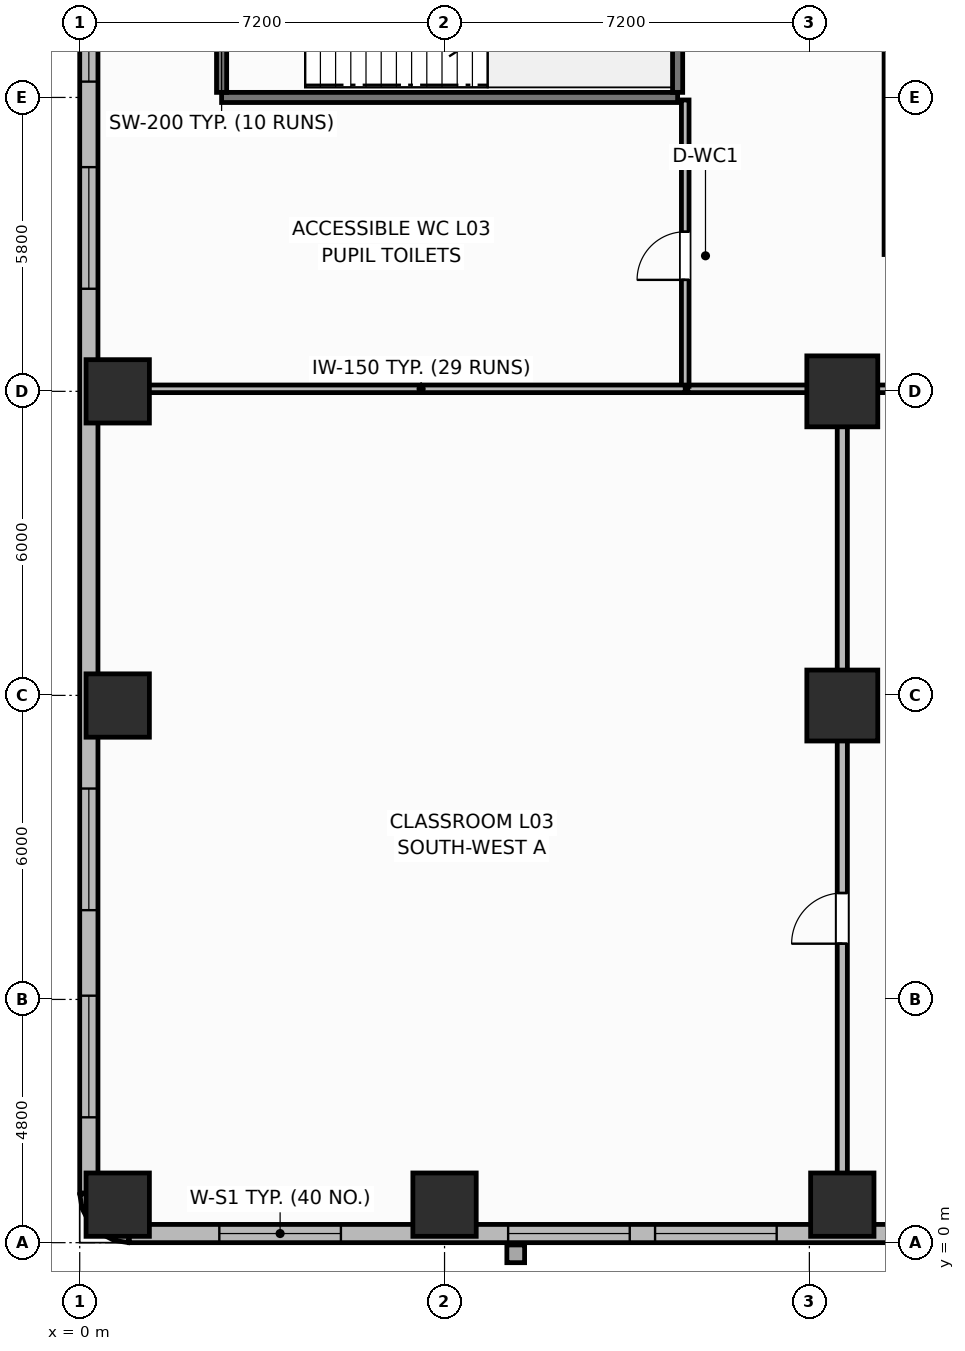
"""IFC4 building model, lengths in metres.
Left out: names, types, materials, properties, quantities, classifications, styles, units other than length and angle.
Written with IfcOpenShell. Run it as: python <this file> out.ifc"""

import sys

from ifc_helpers import new_model, si_unit, direction, frame, frame_2d, origin, origin_2d, place, context, subcontext, project, spatial, rectangle, extrude, element, fill, save


model = new_model("IFC4")
c1 = context("Model", 3, precision=1e-05, world=origin(), true_north=direction((0.0, 1.0)))
c2 = subcontext(c1, "Body", "Model", "MODEL_VIEW")
j1 = project(units=[si_unit("LENGTHUNIT", "METRE"), si_unit("PLANEANGLEUNIT", "RADIAN")], contexts=[c1])
p1 = place(None, origin())
s1 = spatial("IfcSite", under=j1, at=p1, CompositionType="ELEMENT")
p2 = place(p1, origin())
s2 = spatial("IfcBuilding", under=s1, at=p2, CompositionType="ELEMENT")
p3 = place(p2, frame((0.0, 0.0, 15.6)))
s3 = spatial("IfcBuildingStorey", under=s2, at=p3, CompositionType="ELEMENT", Elevation=15.6)
for number, where, z_axis, x_axis in (
    (1, (0.75, 0.75, 0.0), (0.0, 0.0, 1.0), (1.0, 0.0, 0.0)),
    (2, (0.75, 10.6, 0.0), (0.0, 0.0, 1.0), (1.0, 0.0, 0.0)),
    (3, (0.75, 16.8, 0.0), (0.0, 0.0, 1.0), (1.0, 0.0, 0.0)),
    (4, (7.2, 0.75, 0.0), (0.0, 0.0, 1.0), (1.0, 0.0, 0.0)),
    (5, (15.05, 0.75, 0.0), (0.0, 0.0, 1.0), (1.0, 0.0, 0.0)),
):
    element("IfcColumn", number, at=place(p3, frame(where, z_axis=z_axis, x_axis=x_axis)), inside=s3, PredefinedType="COLUMN", context=c2, shape_type="SweptSolid", body=[
        extrude(rectangle(XDim=1.25, YDim=1.25, at=origin_2d()), origin(), (0.0, 0.0, 1.0), 4.5),
    ])
for number, where, z_axis, x_axis in (
    (6, (15.05, 10.6, 0.0), (0.0, 0.0, 1.0), (1.0, 0.0, 0.0)),
    (7, (15.05, 16.8, 0.0), (0.0, 0.0, 1.0), (1.0, 0.0, 0.0)),
):
    element("IfcColumn", number, at=place(p3, frame(where, z_axis=z_axis, x_axis=x_axis)), inside=s3, PredefinedType="COLUMN", context=c2, shape_type="SweptSolid", body=[
        extrude(rectangle(XDim=1.4, YDim=1.4, at=origin_2d()), origin(), (0.0, 0.0, 1.0), 4.5),
    ])
for number, where, z_axis, x_axis in (
    (8, (0.18, 0.98, 0.0), (0.0, 0.0, 1.0), (0.157, -0.988, 0.0)),
    (9, (0.219, 0.733, 0.0), (0.0, 0.0, 1.0), (0.453, -0.891, 0.0)),
    (10, (0.333, 0.51, 0.0), (0.0, 0.0, 1.0), (0.707, -0.707, 0.0)),
    (11, (0.51, 0.333, 0.0), (0.0, 0.0, 1.0), (0.891, -0.453, 0.0)),
    (12, (0.733, 0.219, 0.0), (0.0, 0.0, 1.0), (0.988, -0.157, 0.0)),
):
    element("IfcWall", number, at=place(p3, frame(where, z_axis=z_axis, x_axis=x_axis)), inside=s3, PredefinedType="SOLIDWALL", context=c2, shape_type="SweptSolid", body=[
        extrude(rectangle(XDim=0.25, YDim=0.36, at=frame_2d((0.125, 0.0))), origin(), (0.0, 0.0, 1.0), 3.48),
    ])
p4 = place(p3, frame((0.98, 0.18, 0.0), z_axis=(0.0, 0.0, 1.0), x_axis=(1.0, 0.0, 0.0)))
e13 = element("IfcWall", 13, at=p4, inside=s3, PredefinedType="SOLIDWALL", context=c2, shape_type="SweptSolid", body=[
    extrude(rectangle(XDim=15.25, YDim=0.36, at=frame_2d((7.625, 0.0))), origin(), (0.0, 0.0, 1.0), 3.48),
])
p5 = place(p4, frame((1.775, 0.0, 0.85)))
e14 = element("IfcOpeningElement", 14, at=p5, cuts=e13, PredefinedType="OPENING", context=c2, shape_type="SweptSolid", body=[
    extrude(rectangle(XDim=2.4, YDim=2.25, at=frame_2d((1.2, 1.125))), frame((0.0, 0.19, 0.0), z_axis=(0.0, -1.0, 0.0), x_axis=(1.0, 0.0, 0.0)), (0.0, 0.0, 1.0), 0.38),
])
p6 = place(p4, frame((7.475, 0.0, 0.85)))
e15 = element("IfcOpeningElement", 15, at=p6, cuts=e13, PredefinedType="OPENING", context=c2, shape_type="SweptSolid", body=[
    extrude(rectangle(XDim=2.4, YDim=2.25, at=frame_2d((1.2, 1.125))), frame((0.0, 0.19, 0.0), z_axis=(0.0, -1.0, 0.0), x_axis=(1.0, 0.0, 0.0)), (0.0, 0.0, 1.0), 0.38),
])
p7 = place(p4, frame((10.375, 0.0, 0.85)))
e16 = element("IfcOpeningElement", 16, at=p7, cuts=e13, PredefinedType="OPENING", context=c2, shape_type="SweptSolid", body=[
    extrude(rectangle(XDim=2.4, YDim=2.25, at=frame_2d((1.2, 1.125))), frame((0.0, 0.19, 0.0), z_axis=(0.0, -1.0, 0.0), x_axis=(1.0, 0.0, 0.0)), (0.0, 0.0, 1.0), 0.38),
])
p8 = place(p3, frame((0.18, 55.42, 0.0), z_axis=(0.0, 0.0, 1.0), x_axis=(0.0, -1.0, 0.0)))
e17 = element("IfcWall", 17, at=p8, inside=s3, PredefinedType="SOLIDWALL", context=c2, shape_type="SweptSolid", body=[
    extrude(rectangle(XDim=54.44, YDim=0.36, at=frame_2d((27.22, 0.0))), origin(), (0.0, 0.0, 1.0), 3.48),
])
p9 = place(p8, frame((1.494, 0.0, 0.85)))
e18 = element("IfcOpeningElement", 18, at=p9, cuts=e17, PredefinedType="OPENING", context=c2, shape_type="SweptSolid", body=[
    extrude(rectangle(XDim=2.4, YDim=2.25, at=frame_2d((1.2, 1.125))), frame((0.0, 0.19, 0.0), z_axis=(0.0, -1.0, 0.0), x_axis=(1.0, 0.0, 0.0)), (0.0, 0.0, 1.0), 0.38),
])
p10 = place(p8, frame((5.582, 0.0, 0.85)))
e19 = element("IfcOpeningElement", 19, at=p10, cuts=e17, PredefinedType="OPENING", context=c2, shape_type="SweptSolid", body=[
    extrude(rectangle(XDim=2.4, YDim=2.25, at=frame_2d((1.2, 1.125))), frame((0.0, 0.19, 0.0), z_axis=(0.0, -1.0, 0.0), x_axis=(1.0, 0.0, 0.0)), (0.0, 0.0, 1.0), 0.38),
])
p11 = place(p8, frame((17.844, 0.0, 0.85)))
e20 = element("IfcOpeningElement", 20, at=p11, cuts=e17, PredefinedType="OPENING", context=c2, shape_type="SweptSolid", body=[
    extrude(rectangle(XDim=2.4, YDim=2.25, at=frame_2d((1.2, 1.125))), frame((0.0, 0.19, 0.0), z_axis=(0.0, -1.0, 0.0), x_axis=(1.0, 0.0, 0.0)), (0.0, 0.0, 1.0), 0.38),
])
p12 = place(p8, frame((21.932, 0.0, 0.85)))
e21 = element("IfcOpeningElement", 21, at=p12, cuts=e17, PredefinedType="OPENING", context=c2, shape_type="SweptSolid", body=[
    extrude(rectangle(XDim=2.4, YDim=2.25, at=frame_2d((1.2, 1.125))), frame((0.0, 0.19, 0.0), z_axis=(0.0, -1.0, 0.0), x_axis=(1.0, 0.0, 0.0)), (0.0, 0.0, 1.0), 0.38),
])
p13 = place(p8, frame((30.108, 0.0, 0.85)))
e22 = element("IfcOpeningElement", 22, at=p13, cuts=e17, PredefinedType="OPENING", context=c2, shape_type="SweptSolid", body=[
    extrude(rectangle(XDim=2.4, YDim=2.25, at=frame_2d((1.2, 1.125))), frame((0.0, 0.19, 0.0), z_axis=(0.0, -1.0, 0.0), x_axis=(1.0, 0.0, 0.0)), (0.0, 0.0, 1.0), 0.38),
])
p14 = place(p8, frame((34.195, 0.0, 0.85)))
e23 = element("IfcOpeningElement", 23, at=p14, cuts=e17, PredefinedType="OPENING", context=c2, shape_type="SweptSolid", body=[
    extrude(rectangle(XDim=2.4, YDim=2.25, at=frame_2d((1.2, 1.125))), frame((0.0, 0.19, 0.0), z_axis=(0.0, -1.0, 0.0), x_axis=(1.0, 0.0, 0.0)), (0.0, 0.0, 1.0), 0.38),
])
p15 = place(p8, frame((46.458, 0.0, 0.85)))
e24 = element("IfcOpeningElement", 24, at=p15, cuts=e17, PredefinedType="OPENING", context=c2, shape_type="SweptSolid", body=[
    extrude(rectangle(XDim=2.4, YDim=2.25, at=frame_2d((1.2, 1.125))), frame((0.0, 0.19, 0.0), z_axis=(0.0, -1.0, 0.0), x_axis=(1.0, 0.0, 0.0)), (0.0, 0.0, 1.0), 0.38),
])
p16 = place(p8, frame((50.546, 0.0, 0.85)))
e25 = element("IfcOpeningElement", 25, at=p16, cuts=e17, PredefinedType="OPENING", context=c2, shape_type="SweptSolid", body=[
    extrude(rectangle(XDim=2.4, YDim=2.25, at=frame_2d((1.2, 1.125))), frame((0.0, 0.19, 0.0), z_axis=(0.0, -1.0, 0.0), x_axis=(1.0, 0.0, 0.0)), (0.0, 0.0, 1.0), 0.38),
])
p17 = place(p3, frame((2.8, 22.6, 0.0), z_axis=(0.0, 0.0, 1.0), x_axis=(1.0, 0.0, 0.0)))
e26 = element("IfcWall", 26, at=p17, inside=s3, PredefinedType="SHEAR", context=c2, shape_type="SweptSolid", body=[
    extrude(rectangle(XDim=9.0, YDim=0.2, at=frame_2d((4.5, 0.0))), origin(), (0.0, 0.0, 1.0), 4.5),
])
for number, where, z_axis, x_axis in (
    (27, (2.8, 22.7, 0.0), (0.0, 0.0, 1.0), (0.0, 1.0, 0.0)),
    (28, (11.8, 22.7, 0.0), (0.0, 0.0, 1.0), (0.0, 1.0, 0.0)),
):
    element("IfcWall", number, at=place(p3, frame(where, z_axis=z_axis, x_axis=x_axis)), inside=s3, PredefinedType="SHEAR", context=c2, shape_type="SweptSolid", body=[
        extrude(rectangle(XDim=3.4, YDim=0.2, at=frame_2d((1.7, 0.0))), origin(), (0.0, 0.0, 1.0), 4.5),
    ])
p18 = place(p3, frame((15.95, 19.5, 0.0), z_axis=(0.0, 0.0, 1.0), x_axis=(0.0, 1.0, 0.0)))
e29 = element("IfcWall", 29, at=p18, inside=s3, PredefinedType="PARTITIONING", context=c2, shape_type="SweptSolid", body=[
    extrude(rectangle(XDim=17.4, YDim=0.15, at=frame_2d((8.7, 0.0))), origin(), (0.0, 0.0, 1.0), 3.42),
])
p19 = place(p3, frame((15.05, 0.4, 0.0), z_axis=(0.0, 0.0, 1.0), x_axis=(0.0, 1.0, 0.0)))
e30 = element("IfcWall", 30, at=p19, inside=s3, PredefinedType="PARTITIONING", context=c2, shape_type="SweptSolid", body=[
    extrude(rectangle(XDim=16.4, YDim=0.2, at=frame_2d((8.2, 0.0))), origin(), (0.0, 0.0, 1.0), 3.42),
])
p20 = place(p19, frame((5.5, 0.0, 0.0)))
e31 = element("IfcOpeningElement", 31, at=p20, cuts=e30, PredefinedType="OPENING", context=c2, shape_type="SweptSolid", body=[
    extrude(rectangle(XDim=1.0, YDim=2.15, at=frame_2d((0.5, 1.075))), frame((0.0, 0.11, 0.0), z_axis=(0.0, -1.0, 0.0), x_axis=(1.0, 0.0, 0.0)), (0.0, 0.0, 1.0), 0.22),
])
p21 = place(p3, frame((12.0, 16.85, 0.0), z_axis=(0.0, 0.0, 1.0), x_axis=(1.0, 0.0, 0.0)))
e32 = element("IfcWall", 32, at=p21, inside=s3, PredefinedType="PARTITIONING", context=c2, shape_type="SweptSolid", body=[
    extrude(rectangle(XDim=13.25, YDim=0.15, at=frame_2d((6.625, 0.0))), origin(), (0.0, 0.0, 1.0), 3.42),
])
p22 = place(p21, frame((7.5, 0.0, 0.0)))
e33 = element("IfcOpeningElement", 33, at=p22, cuts=e32, PredefinedType="OPENING", context=c2, shape_type="SweptSolid", body=[
    extrude(rectangle(XDim=1.0, YDim=2.15, at=frame_2d((0.5, 1.075))), frame((0.0, 0.085, 0.0), z_axis=(0.0, -1.0, 0.0), x_axis=(1.0, 0.0, 0.0)), (0.0, 0.0, 1.0), 0.17),
])
p23 = place(p3, frame((11.95, 16.9, 0.0), z_axis=(0.0, 0.0, 1.0), x_axis=(0.0, 1.0, 0.0)))
e34 = element("IfcWall", 34, at=p23, inside=s3, PredefinedType="PARTITIONING", context=c2, shape_type="SweptSolid", body=[
    extrude(rectangle(XDim=5.65, YDim=0.15, at=frame_2d((2.825, 0.0))), origin(), (0.0, 0.0, 1.0), 3.42),
])
p24 = place(p23, frame((2.1, 0.0, 0.0)))
e35 = element("IfcOpeningElement", 35, at=p24, cuts=e34, PredefinedType="OPENING", context=c2, shape_type="SweptSolid", body=[
    extrude(rectangle(XDim=0.95, YDim=2.1, at=frame_2d((0.475, 1.05))), frame((0.0, 0.085, 0.0), z_axis=(0.0, -1.0, 0.0), x_axis=(1.0, 0.0, 0.0)), (0.0, 0.0, 1.0), 0.17),
])
p25 = place(p3, frame((0.4, 16.85, 0.0), z_axis=(0.0, 0.0, 1.0), x_axis=(1.0, 0.0, 0.0)))
e36 = element("IfcWall", 36, at=p25, inside=s3, PredefinedType="PARTITIONING", context=c2, shape_type="SweptSolid", body=[
    extrude(rectangle(XDim=11.55, YDim=0.15, at=frame_2d((5.775, 0.0))), origin(), (0.0, 0.0, 1.0), 3.42),
])
p26 = place(p5, origin())
e37 = element("IfcWindow", 37, at=p26, inside=s3, PartitioningType="SINGLE_PANEL", PredefinedType="WINDOW", context=c2, shape_type="SweptSolid", body=[
    extrude(rectangle(XDim=2.4, YDim=2.25, at=frame_2d((1.2, 1.125))), frame((0.0, 0.03, 0.0), z_axis=(0.0, -1.0, 0.0), x_axis=(1.0, 0.0, 0.0)), (0.0, 0.0, 1.0), 0.06),
])
fill(e14, e37)
p27 = place(p6, origin())
e38 = element("IfcWindow", 38, at=p27, inside=s3, PartitioningType="SINGLE_PANEL", PredefinedType="WINDOW", context=c2, shape_type="SweptSolid", body=[
    extrude(rectangle(XDim=2.4, YDim=2.25, at=frame_2d((1.2, 1.125))), frame((0.0, 0.03, 0.0), z_axis=(0.0, -1.0, 0.0), x_axis=(1.0, 0.0, 0.0)), (0.0, 0.0, 1.0), 0.06),
])
fill(e15, e38)
p28 = place(p7, origin())
e39 = element("IfcWindow", 39, at=p28, inside=s3, PartitioningType="SINGLE_PANEL", PredefinedType="WINDOW", context=c2, shape_type="SweptSolid", body=[
    extrude(rectangle(XDim=2.4, YDim=2.25, at=frame_2d((1.2, 1.125))), frame((0.0, 0.03, 0.0), z_axis=(0.0, -1.0, 0.0), x_axis=(1.0, 0.0, 0.0)), (0.0, 0.0, 1.0), 0.06),
])
fill(e16, e39)
p29 = place(p13, origin())
e40 = element("IfcWindow", 40, at=p29, inside=s3, PartitioningType="SINGLE_PANEL", PredefinedType="WINDOW", context=c2, shape_type="SweptSolid", body=[
    extrude(rectangle(XDim=2.4, YDim=2.25, at=frame_2d((1.2, 1.125))), frame((0.0, 0.03, 0.0), z_axis=(0.0, -1.0, 0.0), x_axis=(1.0, 0.0, 0.0)), (0.0, 0.0, 1.0), 0.06),
])
fill(e22, e40)
p30 = place(p14, origin())
e41 = element("IfcWindow", 41, at=p30, inside=s3, PartitioningType="SINGLE_PANEL", PredefinedType="WINDOW", context=c2, shape_type="SweptSolid", body=[
    extrude(rectangle(XDim=2.4, YDim=2.25, at=frame_2d((1.2, 1.125))), frame((0.0, 0.03, 0.0), z_axis=(0.0, -1.0, 0.0), x_axis=(1.0, 0.0, 0.0)), (0.0, 0.0, 1.0), 0.06),
])
fill(e23, e41)
p31 = place(p15, origin())
e42 = element("IfcWindow", 42, at=p31, inside=s3, PartitioningType="SINGLE_PANEL", PredefinedType="WINDOW", context=c2, shape_type="SweptSolid", body=[
    extrude(rectangle(XDim=2.4, YDim=2.25, at=frame_2d((1.2, 1.125))), frame((0.0, 0.03, 0.0), z_axis=(0.0, -1.0, 0.0), x_axis=(1.0, 0.0, 0.0)), (0.0, 0.0, 1.0), 0.06),
])
fill(e24, e42)
p32 = place(p16, origin())
e43 = element("IfcWindow", 43, at=p32, inside=s3, PartitioningType="SINGLE_PANEL", PredefinedType="WINDOW", context=c2, shape_type="SweptSolid", body=[
    extrude(rectangle(XDim=2.4, YDim=2.25, at=frame_2d((1.2, 1.125))), frame((0.0, 0.03, 0.0), z_axis=(0.0, -1.0, 0.0), x_axis=(1.0, 0.0, 0.0)), (0.0, 0.0, 1.0), 0.06),
])
fill(e25, e43)
p33 = place(p20, origin())
e44 = element("IfcDoor", 44, at=p33, inside=s3, OperationType="SINGLE_SWING_LEFT", PredefinedType="DOOR", context=c2, shape_type="SweptSolid", body=[
    extrude(rectangle(XDim=1.0, YDim=2.15, at=frame_2d((0.5, 1.075))), frame((0.0, 0.025, 0.0), z_axis=(0.0, -1.0, 0.0), x_axis=(1.0, 0.0, 0.0)), (0.0, 0.0, 1.0), 0.05),
])
fill(e31, e44)
p34 = place(p24, origin())
e45 = element("IfcDoor", 45, at=p34, inside=s3, OperationType="SINGLE_SWING_LEFT", PredefinedType="DOOR", context=c2, shape_type="SweptSolid", body=[
    extrude(rectangle(XDim=0.95, YDim=2.1, at=frame_2d((0.475, 1.05))), frame((0.0, 0.025, 0.0), z_axis=(0.0, -1.0, 0.0), x_axis=(1.0, 0.0, 0.0)), (0.0, 0.0, 1.0), 0.05),
])
fill(e35, e45)
save(model, sys.argv[1])
